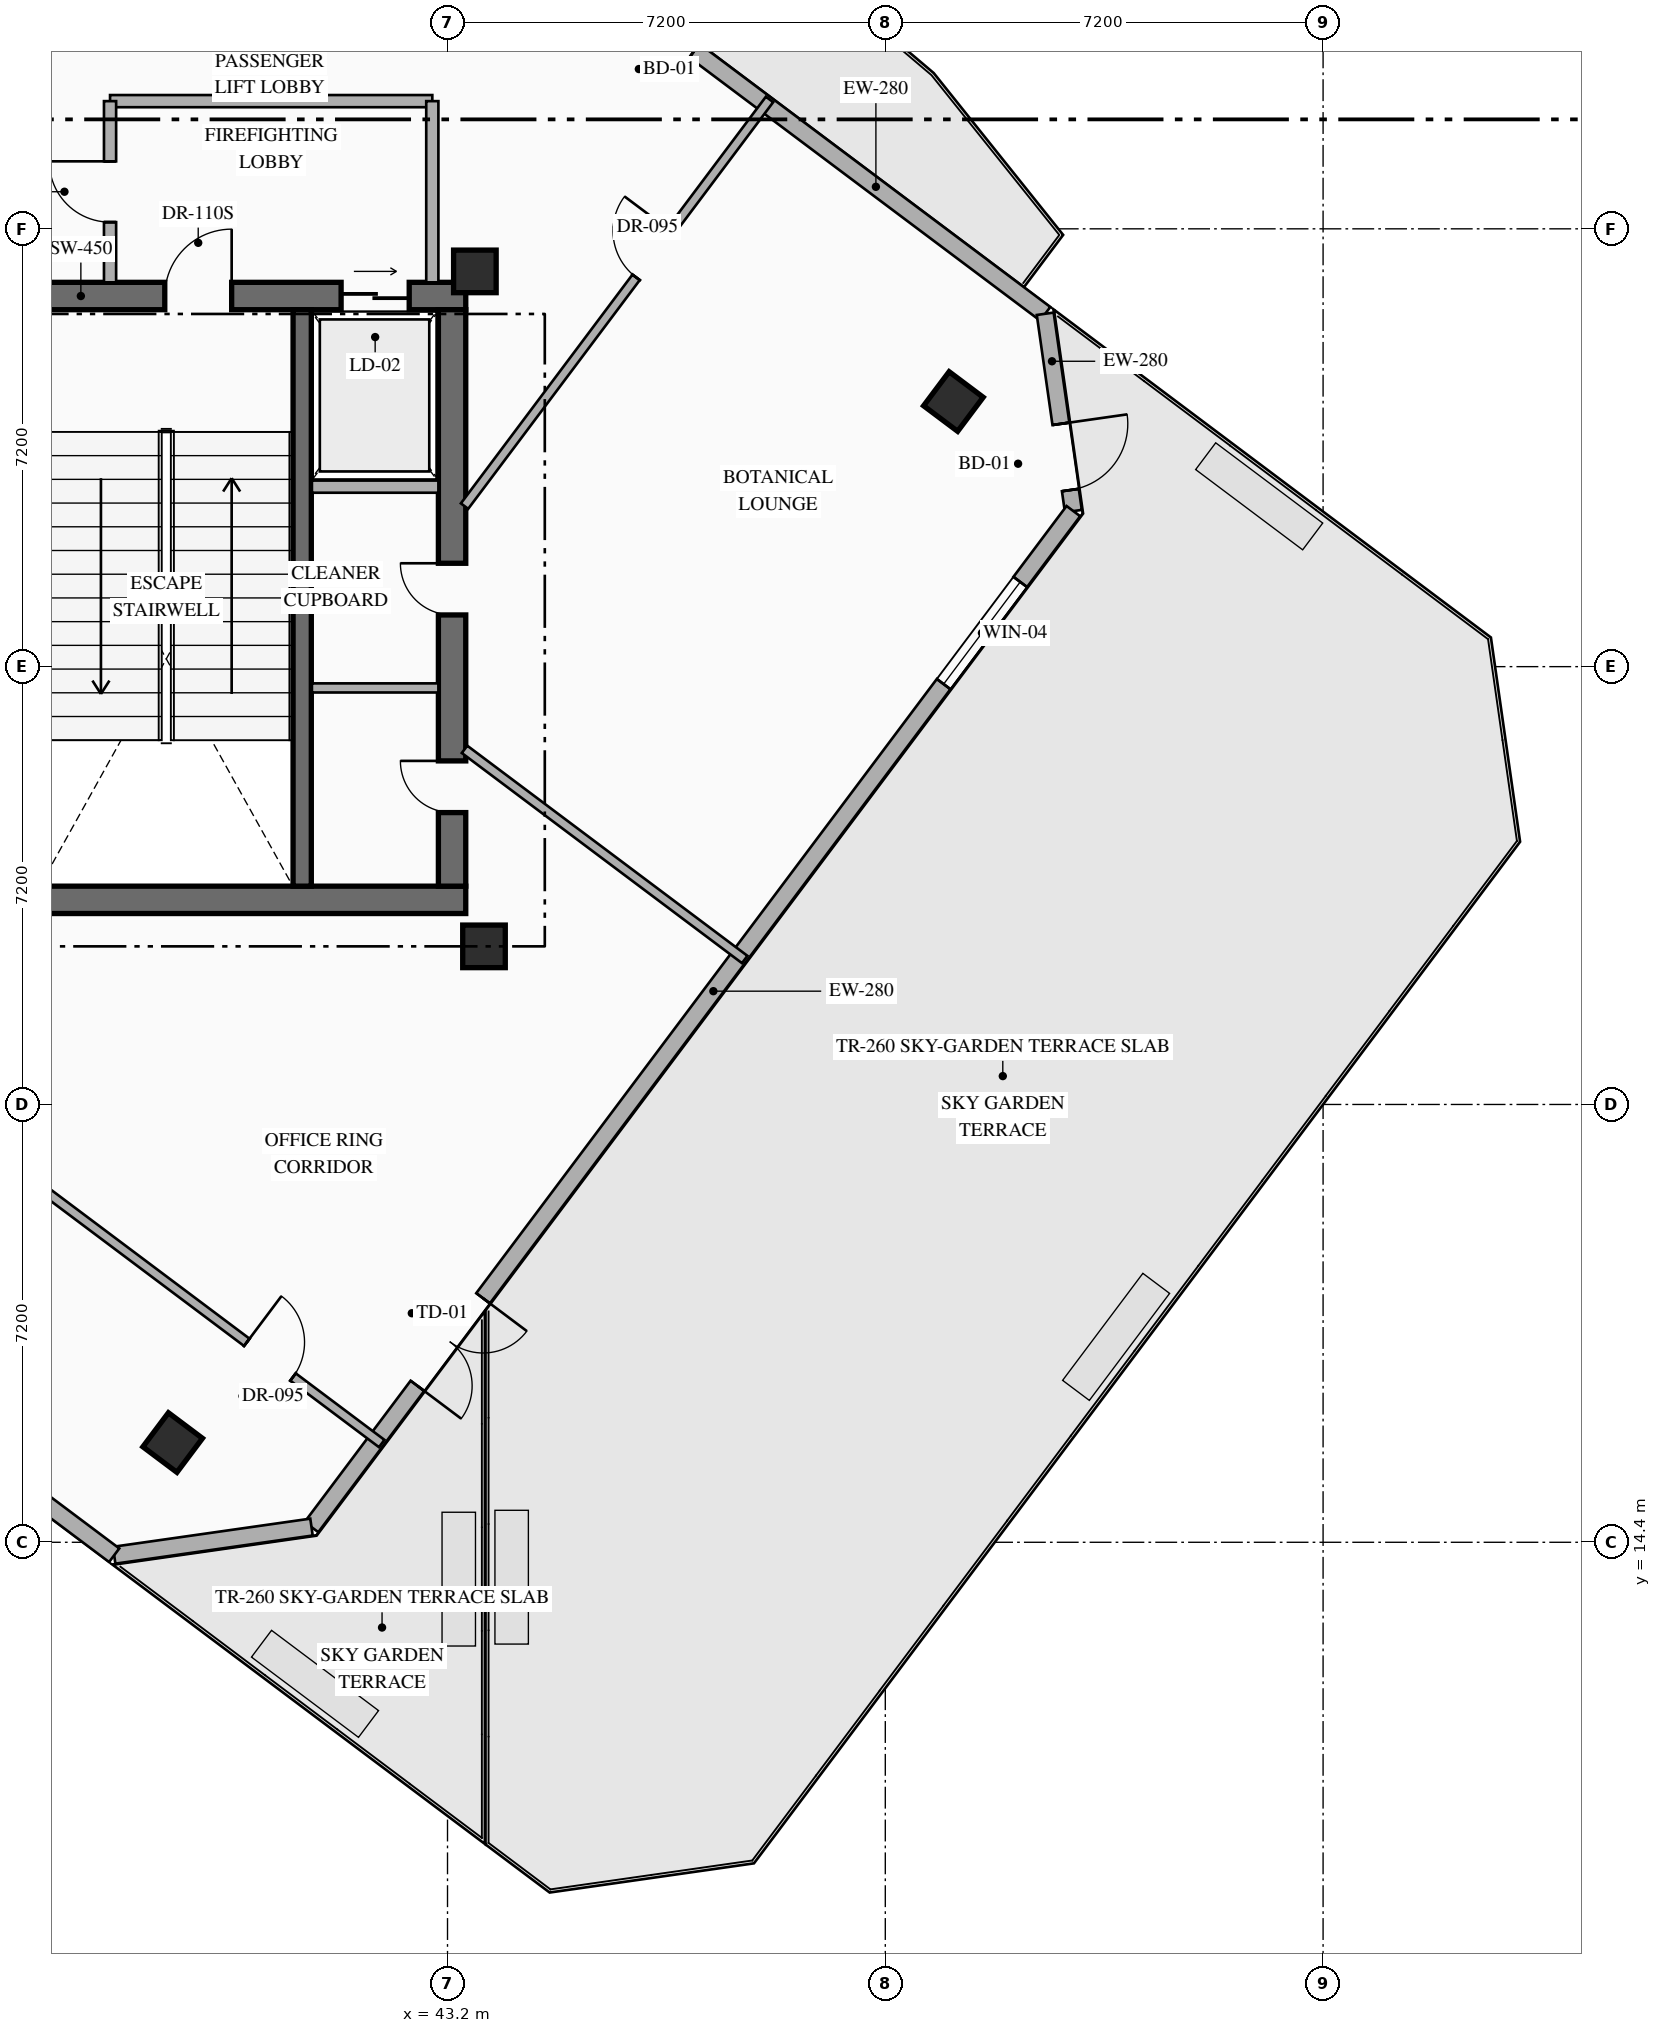
"""IFC4 building model, lengths in metres.
Left out: names, types, materials, properties, quantities, classifications, styles, units other than length and angle.
Written with IfcOpenShell. Run it as: python <this file> out.ifc"""

import sys

from ifc_helpers import new_model, si_unit, direction, frame, frame_2d, origin, origin_2d, place, context, subcontext, project, spatial, rectangle, hollow_rectangle, extrude, element, fill, save


model = new_model("IFC4")
c1 = context("Model", 3, precision=1e-05, world=origin(), true_north=direction((0.0, 1.0)))
c2 = subcontext(c1, "Body", "Model", "MODEL_VIEW")
j1 = project(units=[si_unit("LENGTHUNIT", "METRE"), si_unit("PLANEANGLEUNIT", "RADIAN")], contexts=[c1])
p1 = place(None, origin())
s1 = spatial("IfcSite", under=j1, at=p1, CompositionType="ELEMENT")
p2 = place(p1, origin())
s2 = spatial("IfcBuilding", under=s1, at=p2, CompositionType="ELEMENT")
p3 = place(p2, frame((0.0, 0.0, 234.75)))
s3 = spatial("IfcBuildingStorey", under=s2, at=p3, CompositionType="ELEMENT", Elevation=234.75)
p4 = place(p3, frame((36.04, 24.965, 0.0), z_axis=(0.0, 0.0, 1.0), x_axis=(1.0, 0.0, 0.0)))
e1 = element("IfcWall", 1, at=p4, inside=s3, PredefinedType="SHEAR", context=c2, shape_type="SweptSolid", body=[
    extrude(rectangle(XDim=7.46, YDim=0.45, at=frame_2d((3.73, 0.0))), origin(), (0.0, 0.0, 1.0), 4.8),
])
p5 = place(p3, frame((36.04, 34.895, 0.0), z_axis=(0.0, 0.0, 1.0), x_axis=(1.0, 0.0, 0.0)))
e2 = element("IfcWall", 2, at=p5, inside=s3, PredefinedType="SHEAR", context=c2, shape_type="SweptSolid", body=[
    extrude(rectangle(XDim=7.46, YDim=0.45, at=frame_2d((3.73, 0.0))), origin(), (0.0, 0.0, 1.0), 4.8),
])
p6 = place(p5, frame((2.51, 0.0, 0.0)))
e3 = element("IfcOpeningElement", 3, at=p6, cuts=e2, PredefinedType="OPENING", context=c2, shape_type="SweptSolid", body=[
    extrude(rectangle(XDim=1.1, YDim=2.2, at=frame_2d((0.55, 1.1))), frame((0.0, 0.235, 0.0), z_axis=(0.0, -1.0, 0.0), x_axis=(1.0, 0.0, 0.0)), (0.0, 0.0, 1.0), 0.47),
])
p7 = place(p5, frame((5.41, 0.0, 0.0)))
e4 = element("IfcOpeningElement", 4, at=p7, cuts=e2, PredefinedType="OPENING", context=c2, shape_type="SweptSolid", body=[
    extrude(rectangle(XDim=1.12, YDim=2.15, at=frame_2d((0.56, 1.075))), frame((0.0, 0.235, 0.0), z_axis=(0.0, -1.0, 0.0), x_axis=(1.0, 0.0, 0.0)), (0.0, 0.0, 1.0), 0.47),
])
p8 = place(p3, frame((43.275, 25.19, 0.0), z_axis=(0.0, 0.0, 1.0), x_axis=(0.0, 1.0, 0.0)))
e5 = element("IfcWall", 5, at=p8, inside=s3, PredefinedType="SHEAR", context=c2, shape_type="SweptSolid", body=[
    extrude(rectangle(XDim=9.48, YDim=0.45, at=frame_2d((4.74, 0.0))), origin(), (0.0, 0.0, 1.0), 4.8),
])
p9 = place(p8, frame((1.21, 0.0, 0.0)))
e6 = element("IfcOpeningElement", 6, at=p9, cuts=e5, PredefinedType="OPENING", context=c2, shape_type="SweptSolid", body=[
    extrude(rectangle(XDim=0.85, YDim=2.08, at=frame_2d((0.425, 1.04))), frame((0.0, 0.235, 0.0), z_axis=(0.0, -1.0, 0.0), x_axis=(1.0, 0.0, 0.0)), (0.0, 0.0, 1.0), 0.47),
])
p10 = place(p8, frame((4.46, 0.0, 0.0)))
e7 = element("IfcOpeningElement", 7, at=p10, cuts=e5, PredefinedType="OPENING", context=c2, shape_type="SweptSolid", body=[
    extrude(rectangle(XDim=0.85, YDim=2.08, at=frame_2d((0.425, 1.04))), frame((0.0, 0.235, 0.0), z_axis=(0.0, -1.0, 0.0), x_axis=(1.0, 0.0, 0.0)), (0.0, 0.0, 1.0), 0.47),
])
p11 = place(p3, frame((40.81, 25.19, 0.0), z_axis=(0.0, 0.0, 1.0), x_axis=(0.0, 1.0, 0.0)))
e8 = element("IfcWall", 8, at=p11, inside=s3, PredefinedType="SHEAR", context=c2, shape_type="SweptSolid", body=[
    extrude(rectangle(XDim=9.48, YDim=0.3, at=frame_2d((4.74, 0.0))), origin(), (0.0, 0.0, 1.0), 4.8),
])
for number, where, z_axis, x_axis in (
    (9, (43.8, 24.2, 0.0), (0.0, 0.0, 1.0), (1.0, 0.0, 0.0)),
    (10, (43.65, 35.3, 0.0), (0.0, 0.0, 1.0), (1.0, 0.0, 0.0)),
    (11, (38.68, 16.04, 0.0), (0.0, 0.0, 1.0), (0.8, -0.6, 0.0)),
    (12, (51.52, 33.16, 0.0), (0.0, 0.0, 1.0), (0.8, -0.6, 0.0)),
):
    element("IfcColumn", number, at=place(p3, frame(where, z_axis=z_axis, x_axis=x_axis)), inside=s3, PredefinedType="COLUMN", context=c2, shape_type="SweptSolid", body=[
        extrude(hollow_rectangle(XDim=0.7, YDim=0.7, WallThickness=0.028, at=origin_2d()), origin(), (0.0, 0.0, 1.0), 4.8),
    ])
p12 = place(p3, frame((44.86, 40.73, 0.0), z_axis=(0.0, 0.0, 1.0), x_axis=(0.800022950109, -0.599969398635, 0.0)))
e13 = element("IfcWall", 13, at=p12, inside=s3, PredefinedType="STANDARD", context=c2, shape_type="SweptSolid", body=[
    extrude(rectangle(XDim=10.212, YDim=0.28, at=frame_2d((5.106, 0.0))), origin(), (0.0, 0.0, 1.0), 4.55),
])
p13 = place(p12, frame((1.901, 0.0, 0.0)))
e14 = element("IfcOpeningElement", 14, at=p13, cuts=e13, PredefinedType="OPENING", context=c2, shape_type="SweptSolid", body=[
    extrude(rectangle(XDim=1.1, YDim=2.2, at=frame_2d((0.55, 1.1))), frame((0.0, 0.15, 0.0), z_axis=(0.0, -1.0, 0.0), x_axis=(1.0, 0.0, 0.0)), (0.0, 0.0, 1.0), 0.3),
])
p14 = place(p3, frame((53.03, 34.603, 0.0), z_axis=(0.0, 0.0, 1.0), x_axis=(0.141212810973, -0.989979263428, 0.0)))
e15 = element("IfcWall", 15, at=p14, inside=s3, PredefinedType="STANDARD", context=c2, shape_type="SweptSolid", body=[
    extrude(rectangle(XDim=3.278, YDim=0.28, at=frame_2d((1.639, 0.0))), origin(), (0.0, 0.0, 1.0), 4.55),
])
p15 = place(p14, frame((1.828, 0.0, 0.0)))
e16 = element("IfcOpeningElement", 16, at=p15, cuts=e15, PredefinedType="OPENING", context=c2, shape_type="SweptSolid", body=[
    extrude(rectangle(XDim=1.1, YDim=2.2, at=frame_2d((0.55, 1.1))), frame((0.0, 0.15, 0.0), z_axis=(0.0, -1.0, 0.0), x_axis=(1.0, 0.0, 0.0)), (0.0, 0.0, 1.0), 0.3),
])
p16 = place(p3, frame((53.493, 31.358, 0.0), z_axis=(0.0, 0.0, 1.0), x_axis=(-0.599970072971, -0.800022444397, 0.0)))
e17 = element("IfcWall", 17, at=p16, inside=s3, PredefinedType="STANDARD", context=c2, shape_type="SweptSolid", body=[
    extrude(rectangle(XDim=20.885, YDim=0.28, at=frame_2d((10.442, 0.0))), origin(), (0.0, 0.0, 1.0), 4.55),
])
p17 = place(p16, frame((16.181, 0.0, 0.0)))
e18 = element("IfcOpeningElement", 18, at=p17, cuts=e17, PredefinedType="OPENING", context=c2, shape_type="SweptSolid", body=[
    extrude(rectangle(XDim=1.8, YDim=2.25, at=frame_2d((0.9, 1.125))), frame((0.0, 0.15, 0.0), z_axis=(0.0, -1.0, 0.0), x_axis=(1.0, 0.0, 0.0)), (0.0, 0.0, 1.0), 0.3),
])
p18 = place(p16, frame((1.456, 0.0, 0.75)))
e19 = element("IfcOpeningElement", 19, at=p18, cuts=e17, PredefinedType="OPENING", context=c2, shape_type="SweptSolid", body=[
    extrude(rectangle(XDim=2.1, YDim=2.2, at=frame_2d((1.05, 1.1))), frame((0.0, 0.15, 0.0), z_axis=(0.0, -1.0, 0.0), x_axis=(1.0, 0.0, 0.0)), (0.0, 0.0, 1.0), 0.3),
])
p19 = place(p3, frame((40.963, 14.65, 0.0), z_axis=(0.0, 0.0, 1.0), x_axis=(-0.989977778067, -0.141223223777, 0.0)))
e20 = element("IfcWall", 20, at=p19, inside=s3, PredefinedType="STANDARD", context=c2, shape_type="SweptSolid", body=[
    extrude(rectangle(XDim=3.278, YDim=0.28, at=frame_2d((1.639, 0.0))), origin(), (0.0, 0.0, 1.0), 4.55),
])
p20 = place(p3, frame((37.718, 14.187, 0.0), z_axis=(0.0, 0.0, 1.0), x_axis=(-0.800005638109, 0.599992482448, 0.0)))
e21 = element("IfcWall", 21, at=p20, inside=s3, PredefinedType="STANDARD", context=c2, shape_type="SweptSolid", body=[
    extrude(rectangle(XDim=15.589, YDim=0.28, at=frame_2d((7.794, 0.0))), origin(), (0.0, 0.0, 1.0), 4.55),
])
p21 = place(p3, frame((40.97, 31.76, 0.0), z_axis=(0.0, 0.0, 1.0), x_axis=(1.0, 0.0, 0.0)))
e22 = element("IfcWall", 22, at=p21, inside=s3, PredefinedType="STANDARD", context=c2, shape_type="SweptSolid", body=[
    extrude(rectangle(XDim=2.08, YDim=0.2, at=frame_2d((1.04, 0.0))), origin(), (0.0, 0.0, 1.0), 4.55),
])
p22 = place(p3, frame((40.97, 28.45, 0.0), z_axis=(0.0, 0.0, 1.0), x_axis=(1.0, 0.0, 0.0)))
e23 = element("IfcWall", 23, at=p22, inside=s3, PredefinedType="PARTITIONING", context=c2, shape_type="SweptSolid", body=[
    extrude(rectangle(XDim=2.08, YDim=0.15, at=frame_2d((1.04, 0.0))), origin(), (0.0, 0.0, 1.0), 4.55),
])
p23 = place(p3, frame((37.65, 38.1, 0.0), z_axis=(0.0, 0.0, 1.0), x_axis=(1.0, 0.0, 0.0)))
e24 = element("IfcWall", 24, at=p23, inside=s3, PredefinedType="STANDARD", context=c2, shape_type="SweptSolid", body=[
    extrude(rectangle(XDim=5.3, YDim=0.2, at=frame_2d((2.65, 0.0))), origin(), (0.0, 0.0, 1.0), 4.55),
])
p24 = place(p3, frame((42.95, 35.12, 0.0), z_axis=(0.0, 0.0, 1.0), x_axis=(0.0, 1.0, 0.0)))
e25 = element("IfcWall", 25, at=p24, inside=s3, PredefinedType="STANDARD", context=c2, shape_type="SweptSolid", body=[
    extrude(rectangle(XDim=2.98, YDim=0.2, at=frame_2d((1.49, 0.0))), origin(), (0.0, 0.0, 1.0), 4.55),
])
p25 = place(p3, frame((37.65, 35.12, 0.0), z_axis=(0.0, 0.0, 1.0), x_axis=(0.0, 1.0, 0.0)))
e26 = element("IfcWall", 26, at=p25, inside=s3, PredefinedType="STANDARD", context=c2, shape_type="SweptSolid", body=[
    extrude(rectangle(XDim=2.98, YDim=0.2, at=frame_2d((1.49, 0.0))), origin(), (0.0, 0.0, 1.0), 4.55),
])
p26 = place(p25, frame((0.99, 0.0, 0.0)))
e27 = element("IfcOpeningElement", 27, at=p26, cuts=e26, PredefinedType="OPENING", context=c2, shape_type="SweptSolid", body=[
    extrude(rectangle(XDim=1.0, YDim=2.2, at=frame_2d((0.5, 1.1))), frame((0.0, 0.11, 0.0), z_axis=(0.0, -1.0, 0.0), x_axis=(1.0, 0.0, 0.0)), (0.0, 0.0, 1.0), 0.22),
])
p27 = place(p3, frame((43.48, 27.44, 0.0), z_axis=(0.0, 0.0, 1.0), x_axis=(0.79998982729, -0.600013563374, 0.0)))
e28 = element("IfcWall", 28, at=p27, inside=s3, PredefinedType="PARTITIONING", context=c2, shape_type="SweptSolid", body=[
    extrude(rectangle(XDim=5.76, YDim=0.15, at=frame_2d((2.88, 0.0))), origin(), (0.0, 0.0, 1.0), 4.55),
])
p28 = place(p3, frame((43.48, 31.44, 0.0), z_axis=(0.0, 0.0, 1.0), x_axis=(0.600009344989, 0.799992991173, 0.0)))
e29 = element("IfcWall", 29, at=p28, inside=s3, PredefinedType="PARTITIONING", context=c2, shape_type="SweptSolid", body=[
    extrude(rectangle(XDim=8.36, YDim=0.15, at=frame_2d((4.18, 0.0))), origin(), (0.0, 0.0, 1.0), 4.55),
])
p29 = place(p28, frame((4.703, 0.0, 0.0)))
e30 = element("IfcOpeningElement", 30, at=p29, cuts=e29, PredefinedType="OPENING", context=c2, shape_type="SweptSolid", body=[
    extrude(rectangle(XDim=0.95, YDim=2.15, at=frame_2d((0.475, 1.075))), frame((0.0, 0.085, 0.0), z_axis=(0.0, -1.0, 0.0), x_axis=(1.0, 0.0, 0.0)), (0.0, 0.0, 1.0), 0.17),
])
p30 = place(p3, frame((27.91, 26.68, 0.0), z_axis=(0.0, 0.0, 1.0), x_axis=(0.8, -0.6, 0.0)))
e31 = element("IfcWall", 31, at=p30, inside=s3, PredefinedType="PARTITIONING", context=c2, shape_type="SweptSolid", body=[
    extrude(rectangle(XDim=17.76, YDim=0.15, at=frame_2d((8.88, 0.0))), origin(), (0.0, 0.0, 1.0), 4.55),
])
p31 = place(p30, frame((14.986, 0.0, 0.0)))
e32 = element("IfcOpeningElement", 32, at=p31, cuts=e31, PredefinedType="OPENING", context=c2, shape_type="SweptSolid", body=[
    extrude(rectangle(XDim=0.95, YDim=2.15, at=frame_2d((0.475, 1.075))), frame((0.0, 0.085, 0.0), z_axis=(0.0, -1.0, 0.0), x_axis=(1.0, 0.0, 0.0)), (0.0, 0.0, 1.0), 0.17),
])
p32 = place(p15, origin())
e33 = element("IfcDoor", 33, at=p32, inside=s3, OperationType="SINGLE_SWING_LEFT", PredefinedType="DOOR", context=c2, shape_type="SweptSolid", body=[
    extrude(rectangle(XDim=1.1, YDim=2.2, at=frame_2d((0.55, 1.1))), frame((0.0, 0.025, 0.0), z_axis=(0.0, -1.0, 0.0), x_axis=(1.0, 0.0, 0.0)), (0.0, 0.0, 1.0), 0.05),
])
fill(e16, e33)
p33 = place(p17, origin())
e34 = element("IfcDoor", 34, at=p33, inside=s3, OperationType="DOUBLE_DOOR_SINGLE_SWING", PredefinedType="DOOR", context=c2, shape_type="SweptSolid", body=[
    extrude(rectangle(XDim=1.8, YDim=2.25, at=frame_2d((0.9, 1.125))), frame((0.0, 0.025, 0.0), z_axis=(0.0, -1.0, 0.0), x_axis=(1.0, 0.0, 0.0)), (0.0, 0.0, 1.0), 0.05),
])
fill(e18, e34)
p34 = place(p18, origin())
e35 = element("IfcWindow", 35, at=p34, inside=s3, PartitioningType="SINGLE_PANEL", PredefinedType="WINDOW", context=c2, shape_type="SweptSolid", body=[
    extrude(rectangle(XDim=2.1, YDim=2.2, at=frame_2d((1.05, 1.1))), frame((0.0, 0.03, 0.0), z_axis=(0.0, -1.0, 0.0), x_axis=(1.0, 0.0, 0.0)), (0.0, 0.0, 1.0), 0.06),
])
fill(e19, e35)
p35 = place(p6, origin())
e36 = element("IfcDoor", 36, at=p35, inside=s3, OperationType="SINGLE_SWING_RIGHT", PredefinedType="DOOR", context=c2, shape_type="SweptSolid", body=[
    extrude(rectangle(XDim=1.1, YDim=2.2, at=frame_2d((0.55, 1.1))), frame((0.0, 0.025, 0.0), z_axis=(0.0, -1.0, 0.0), x_axis=(1.0, 0.0, 0.0)), (0.0, 0.0, 1.0), 0.05),
])
fill(e3, e36)
p36 = place(p7, origin())
e37 = element("IfcDoor", 37, at=p36, inside=s3, OperationType="SLIDING_TO_RIGHT", PredefinedType="USERDEFINED", context=c2, shape_type="SweptSolid", body=[
    extrude(rectangle(XDim=1.12, YDim=2.15, at=frame_2d((0.56, 1.075))), frame((0.0, 0.025, 0.0), z_axis=(0.0, -1.0, 0.0), x_axis=(1.0, 0.0, 0.0)), (0.0, 0.0, 1.0), 0.05),
])
fill(e4, e37)
p37 = place(p9, origin())
e38 = element("IfcDoor", 38, at=p37, inside=s3, OperationType="SINGLE_SWING_RIGHT", PredefinedType="DOOR", context=c2, shape_type="SweptSolid", body=[
    extrude(rectangle(XDim=0.85, YDim=2.08, at=frame_2d((0.425, 1.04))), frame((0.0, 0.025, 0.0), z_axis=(0.0, -1.0, 0.0), x_axis=(1.0, 0.0, 0.0)), (0.0, 0.0, 1.0), 0.05),
])
fill(e6, e38)
p38 = place(p10, origin())
e39 = element("IfcDoor", 39, at=p38, inside=s3, OperationType="SINGLE_SWING_RIGHT", PredefinedType="DOOR", context=c2, shape_type="SweptSolid", body=[
    extrude(rectangle(XDim=0.85, YDim=2.08, at=frame_2d((0.425, 1.04))), frame((0.0, 0.025, 0.0), z_axis=(0.0, -1.0, 0.0), x_axis=(1.0, 0.0, 0.0)), (0.0, 0.0, 1.0), 0.05),
])
fill(e7, e39)
p39 = place(p26, origin())
e40 = element("IfcDoor", 40, at=p39, inside=s3, OperationType="SINGLE_SWING_RIGHT", PredefinedType="DOOR", context=c2, shape_type="SweptSolid", body=[
    extrude(rectangle(XDim=1.0, YDim=2.2, at=frame_2d((0.5, 1.1))), frame((0.0, 0.025, 0.0), z_axis=(0.0, -1.0, 0.0), x_axis=(1.0, 0.0, 0.0)), (0.0, 0.0, 1.0), 0.05),
])
fill(e27, e40)
p40 = place(p29, origin())
e41 = element("IfcDoor", 41, at=p40, inside=s3, OperationType="SINGLE_SWING_RIGHT", PredefinedType="DOOR", context=c2, shape_type="SweptSolid", body=[
    extrude(rectangle(XDim=0.95, YDim=2.15, at=frame_2d((0.475, 1.075))), frame((0.0, 0.025, 0.0), z_axis=(0.0, -1.0, 0.0), x_axis=(1.0, 0.0, 0.0)), (0.0, 0.0, 1.0), 0.05),
])
fill(e30, e41)
p41 = place(p31, origin())
e42 = element("IfcDoor", 42, at=p41, inside=s3, OperationType="SINGLE_SWING_LEFT", PredefinedType="DOOR", context=c2, shape_type="SweptSolid", body=[
    extrude(rectangle(XDim=0.95, YDim=2.15, at=frame_2d((0.475, 1.075))), frame((0.0, 0.025, 0.0), z_axis=(0.0, -1.0, 0.0), x_axis=(1.0, 0.0, 0.0)), (0.0, 0.0, 1.0), 0.05),
])
fill(e32, e42)
save(model, sys.argv[1])
